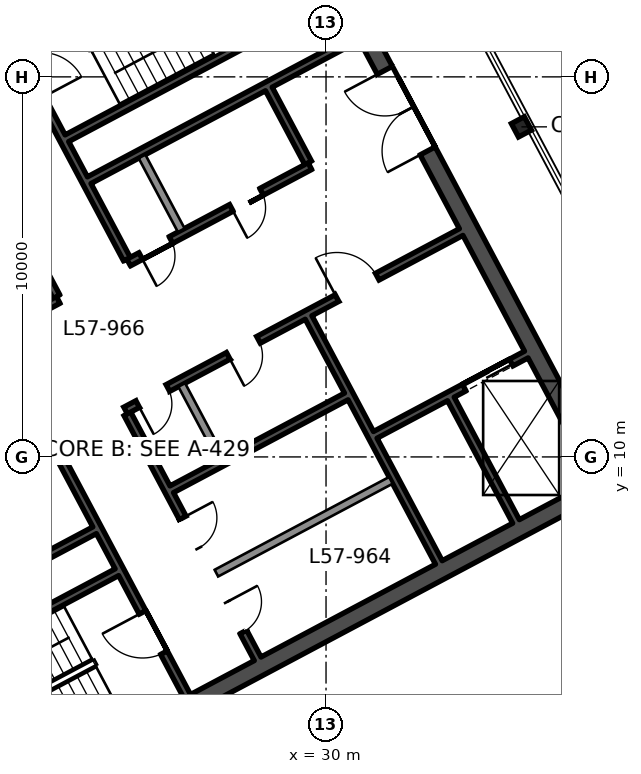
"""IFC4 building model, lengths in metres.
Left out: names, types, materials, properties, quantities, classifications, styles, units other than length and angle.
Written with IfcOpenShell. Run it as: python <this file> out.ifc"""

import sys

from ifc_helpers import new_model, si_unit, direction, frame, frame_2d, origin, origin_2d, place, context, subcontext, project, spatial, rectangle, i_section, extrude, element, fill, save


model = new_model("IFC4")
c1 = context("Model", 3, precision=1e-05, world=origin(), true_north=direction((0.0, 1.0)))
c2 = subcontext(c1, "Body", "Model", "MODEL_VIEW")
j1 = project(units=[si_unit("LENGTHUNIT", "METRE"), si_unit("PLANEANGLEUNIT", "RADIAN")], contexts=[c1])
p1 = place(None, origin())
s1 = spatial("IfcSite", under=j1, at=p1, CompositionType="ELEMENT")
p2 = place(p1, origin())
s2 = spatial("IfcBuilding", under=s1, at=p2, CompositionType="ELEMENT")
p3 = place(p2, frame((0.0, 0.0, 258.0)))
s3 = spatial("IfcBuildingStorey", under=s2, at=p3, CompositionType="ELEMENT", Elevation=258.0)
p4 = place(p3, frame((35.141, 18.685, 0.0), z_axis=(0.0, 0.0, 1.0), x_axis=(-0.469471562786, 0.882947592859, 0.0)))
e1 = element("IfcColumn", 1, at=p4, inside=s3, PredefinedType="COLUMN", context=c2, shape_type="SweptSolid", body=[
    extrude(i_section(OverallWidth=0.399, OverallDepth=0.386, WebThickness=0.021, FlangeThickness=0.033, FilletRadius=0.015, at=origin_2d()), origin(), (0.0, 0.0, 1.0), 3.9),
])
p5 = place(p3, frame((37.439, 9.091, 0.0), z_axis=(0.0, 0.0, 1.0), x_axis=(-0.469467968382, 0.882949504028, 0.0)))
e2 = element("IfcWall", 2, at=p5, inside=s3, PredefinedType="SHEAR", context=c2, shape_type="SweptSolid", body=[
    extrude(rectangle(XDim=19.1, YDim=0.45, at=frame_2d((9.55, 0.0))), origin(), (0.0, 0.0, 1.0), 3.9),
])
p6 = place(p5, frame((10.15, 0.0, 0.0)))
e3 = element("IfcOpeningElement", 3, at=p6, cuts=e2, PredefinedType="OPENING", context=c2, shape_type="SweptSolid", body=[
    extrude(rectangle(XDim=2.4, YDim=2.4, at=frame_2d((1.2, 1.2))), frame((0.0, 0.235, 0.0), z_axis=(0.0, -1.0, 0.0), x_axis=(1.0, 0.0, 0.0)), (0.0, 0.0, 1.0), 0.47),
])
p7 = place(p3, frame((19.3, -0.299, 0.0), z_axis=(0.0, 0.0, 1.0), x_axis=(0.88295276571, 0.46946183394, 0.0)))
e4 = element("IfcWall", 4, at=p7, inside=s3, PredefinedType="SHEAR", context=c2, shape_type="SweptSolid", body=[
    extrude(rectangle(XDim=20.2, YDim=0.45, at=frame_2d((10.1, 0.0))), origin(), (0.0, 0.0, 1.0), 3.9),
])
p8 = place(p3, frame((10.544, 16.167, 0.0), z_axis=(0.0, 0.0, 1.0), x_axis=(0.882947755831, 0.46947125628, 0.0)))
e5 = element("IfcWall", 5, at=p8, inside=s3, PredefinedType="SHEAR", context=c2, shape_type="SweptSolid", body=[
    extrude(rectangle(XDim=20.2, YDim=0.45, at=frame_2d((10.1, 0.0))), origin(), (0.0, 0.0, 1.0), 3.9),
])
p9 = place(p3, frame((26.346, 3.702, 0.0), z_axis=(0.0, 0.0, 1.0), x_axis=(-0.469480409012, 0.88294288918, 0.0)))
e6 = element("IfcWall", 6, at=p9, inside=s3, PredefinedType="SHEAR", context=c2, shape_type="SweptSolid", body=[
    extrude(rectangle(XDim=7.3, YDim=0.2, at=frame_2d((3.65, 0.0))), origin(), (0.0, 0.0, 1.0), 3.9),
])
p10 = place(p9, frame((1.3, 0.0, 0.0)))
e7 = element("IfcOpeningElement", 7, at=p10, cuts=e6, PredefinedType="OPENING", context=c2, shape_type="SweptSolid", body=[
    extrude(rectangle(XDim=1.2, YDim=2.1, at=frame_2d((0.6, 1.05))), frame((0.0, 0.11, 0.0), z_axis=(0.0, -1.0, 0.0), x_axis=(1.0, 0.0, 0.0)), (0.0, 0.0, 1.0), 0.22),
])
p11 = place(p3, frame((22.906, 14.218, 0.0), z_axis=(0.0, 0.0, 1.0), x_axis=(-0.469480409012, 0.88294288918, 0.0)))
e8 = element("IfcWall", 8, at=p11, inside=s3, PredefinedType="SHEAR", context=c2, shape_type="SweptSolid", body=[
    extrude(rectangle(XDim=7.3, YDim=0.2, at=frame_2d((3.65, 0.0))), origin(), (0.0, 0.0, 1.0), 3.9),
])
p12 = place(p11, frame((2.6, 0.0, 0.0)))
e9 = element("IfcOpeningElement", 9, at=p12, cuts=e8, PredefinedType="OPENING", context=c2, shape_type="SweptSolid", body=[
    extrude(rectangle(XDim=0.9, YDim=2.1, at=frame_2d((0.45, 1.05))), frame((0.0, 0.11, 0.0), z_axis=(0.0, -1.0, 0.0), x_axis=(1.0, 0.0, 0.0)), (0.0, 0.0, 1.0), 0.22),
])
p13 = place(p11, frame((4.2, 0.0, 0.0)))
e10 = element("IfcOpeningElement", 10, at=p13, cuts=e8, PredefinedType="OPENING", context=c2, shape_type="SweptSolid", body=[
    extrude(rectangle(XDim=0.9, YDim=2.1, at=frame_2d((0.45, 1.05))), frame((0.0, 0.11, 0.0), z_axis=(0.0, -1.0, 0.0), x_axis=(1.0, 0.0, 0.0)), (0.0, 0.0, 1.0), 0.22),
])
p14 = place(p11, frame((5.95, 0.0, 0.0)))
e11 = element("IfcOpeningElement", 11, at=p14, cuts=e8, PredefinedType="OPENING", context=c2, shape_type="SweptSolid", body=[
    extrude(rectangle(XDim=0.9, YDim=2.1, at=frame_2d((0.45, 1.05))), frame((0.0, 0.11, 0.0), z_axis=(0.0, -1.0, 0.0), x_axis=(1.0, 0.0, 0.0)), (0.0, 0.0, 1.0), 0.22),
])
p15 = place(p3, frame((28.2, 4.688, 0.0), z_axis=(0.0, 0.0, 1.0), x_axis=(-0.469454336211, 0.882956752176, 0.0)))
e12 = element("IfcWall", 12, at=p15, inside=s3, PredefinedType="SHEAR", context=c2, shape_type="SweptSolid", body=[
    extrude(rectangle(XDim=7.3, YDim=0.2, at=frame_2d((3.65, 0.0))), origin(), (0.0, 0.0, 1.0), 3.9),
])
p16 = place(p15, frame((0.8, 0.0, 0.0)))
e13 = element("IfcOpeningElement", 13, at=p16, cuts=e12, PredefinedType="OPENING", context=c2, shape_type="SweptSolid", body=[
    extrude(rectangle(XDim=0.9, YDim=2.1, at=frame_2d((0.45, 1.05))), frame((0.0, 0.11, 0.0), z_axis=(0.0, -1.0, 0.0), x_axis=(1.0, 0.0, 0.0)), (0.0, 0.0, 1.0), 0.22),
])
p17 = place(p15, frame((3.3, 0.0, 0.0)))
e14 = element("IfcOpeningElement", 14, at=p17, cuts=e12, PredefinedType="OPENING", context=c2, shape_type="SweptSolid", body=[
    extrude(rectangle(XDim=0.9, YDim=2.1, at=frame_2d((0.45, 1.05))), frame((0.0, 0.11, 0.0), z_axis=(0.0, -1.0, 0.0), x_axis=(1.0, 0.0, 0.0)), (0.0, 0.0, 1.0), 0.22),
])
p18 = place(p3, frame((27.236, 9.951, 0.0), z_axis=(0.0, 0.0, 1.0), x_axis=(-0.4694473164, 0.882960484464, 0.0)))
e15 = element("IfcWall", 15, at=p18, inside=s3, PredefinedType="SOLIDWALL", context=c2, shape_type="SweptSolid", body=[
    extrude(rectangle(XDim=2.2, YDim=0.2, at=frame_2d((1.1, 0.0))), origin(), (0.0, 0.0, 1.0), 3.9),
])
p19 = place(p3, frame((24.76, 15.204, 0.0), z_axis=(0.0, 0.0, 1.0), x_axis=(-0.469494272526, 0.882935517501, 0.0)))
e16 = element("IfcWall", 16, at=p19, inside=s3, PredefinedType="SHEAR", context=c2, shape_type="SweptSolid", body=[
    extrude(rectangle(XDim=7.3, YDim=0.2, at=frame_2d((3.65, 0.0))), origin(), (0.0, 0.0, 1.0), 3.9),
])
p20 = place(p19, frame((4.8, 0.0, 0.0)))
e17 = element("IfcOpeningElement", 17, at=p20, cuts=e16, PredefinedType="OPENING", context=c2, shape_type="SweptSolid", body=[
    extrude(rectangle(XDim=1.2, YDim=2.1, at=frame_2d((0.6, 1.05))), frame((0.0, 0.11, 0.0), z_axis=(0.0, -1.0, 0.0), x_axis=(1.0, 0.0, 0.0)), (0.0, 0.0, 1.0), 0.22),
])
p21 = place(p3, frame((26.191, 15.965, 0.0), z_axis=(0.0, 0.0, 1.0), x_axis=(-0.469533832133, 0.882914480843, 0.0)))
e18 = element("IfcWall", 18, at=p21, inside=s3, PredefinedType="SOLIDWALL", context=c2, shape_type="SweptSolid", body=[
    extrude(rectangle(XDim=2.2, YDim=0.2, at=frame_2d((1.1, 0.0))), origin(), (0.0, 0.0, 1.0), 3.9),
])
p22 = place(p3, frame((32.968, 7.223, 0.0), z_axis=(0.0, 0.0, 1.0), x_axis=(-0.469480409012, 0.88294288918, 0.0)))
e19 = element("IfcWall", 19, at=p22, inside=s3, PredefinedType="SHEAR", context=c2, shape_type="SweptSolid", body=[
    extrude(rectangle(XDim=7.3, YDim=0.2, at=frame_2d((3.65, 0.0))), origin(), (0.0, 0.0, 1.0), 3.9),
])
p23 = place(p3, frame((29.528, 17.739, 0.0), z_axis=(0.0, 0.0, 1.0), x_axis=(-0.469401318492, 0.882984938828, 0.0)))
e20 = element("IfcWall", 20, at=p23, inside=s3, PredefinedType="SHEAR", context=c2, shape_type="SweptSolid", body=[
    extrude(rectangle(XDim=2.2, YDim=0.2, at=frame_2d((1.1, 0.0))), origin(), (0.0, 0.0, 1.0), 3.9),
])
p24 = place(p3, frame((34.999, 8.303, 0.0), z_axis=(0.0, 0.0, 1.0), x_axis=(-0.4694665462, 0.882950260207, 0.0)))
e21 = element("IfcWall", 21, at=p24, inside=s3, PredefinedType="SHEAR", context=c2, shape_type="SweptSolid", body=[
    extrude(rectangle(XDim=3.65, YDim=0.2, at=frame_2d((1.825, 0.0))), origin(), (0.0, 0.0, 1.0), 3.9),
])
p25 = place(p3, frame((27.115, 6.942, 0.0), z_axis=(0.0, 0.0, 1.0), x_axis=(0.882934506056, 0.469496174655, 0.0)))
e22 = element("IfcWall", 22, at=p25, inside=s3, PredefinedType="SOLIDWALL", context=c2, shape_type="SweptSolid", body=[
    extrude(rectangle(XDim=5.2, YDim=0.2, at=frame_2d((2.6, 0.0))), origin(), (0.0, 0.0, 1.0), 3.9),
])
p26 = place(p3, frame((17.434, 3.21, 0.0), z_axis=(0.0, 0.0, 1.0), x_axis=(0.882940221191, 0.469485426614, 0.0)))
e23 = element("IfcWall", 23, at=p26, inside=s3, PredefinedType="SHEAR", context=c2, shape_type="SweptSolid", body=[
    extrude(rectangle(XDim=8.0, YDim=0.2, at=frame_2d((4.0, 0.0))), origin(), (0.0, 0.0, 1.0), 3.9),
])
p27 = place(p3, frame((31.296, 10.581, 0.0), z_axis=(0.0, 0.0, 1.0), x_axis=(0.882960433586, 0.469447412093, 0.0)))
e24 = element("IfcWall", 24, at=p27, inside=s3, PredefinedType="SHEAR", context=c2, shape_type="SweptSolid", body=[
    extrude(rectangle(XDim=4.5, YDim=0.2, at=frame_2d((2.25, 0.0))), origin(), (0.0, 0.0, 1.0), 3.9),
])
p28 = place(p27, frame((2.65, 0.0, 0.0)))
e25 = element("IfcOpeningElement", 25, at=p28, cuts=e24, PredefinedType="OPENING", context=c2, shape_type="SweptSolid", body=[
    extrude(rectangle(XDim=1.4, YDim=2.4, at=frame_2d((0.7, 1.2))), frame((0.0, 0.11, 0.0), z_axis=(0.0, -1.0, 0.0), x_axis=(1.0, 0.0, 0.0)), (0.0, 0.0, 1.0), 0.22),
])
p29 = place(p3, frame((16.847, 4.314, 0.0), z_axis=(0.0, 0.0, 1.0), x_axis=(0.882940221191, 0.469485426614, 0.0)))
e26 = element("IfcWall", 26, at=p29, inside=s3, PredefinedType="SHEAR", context=c2, shape_type="SweptSolid", body=[
    extrude(rectangle(XDim=8.0, YDim=0.2, at=frame_2d((4.0, 0.0))), origin(), (0.0, 0.0, 1.0), 3.9),
])
p30 = place(p3, frame((25.941, 9.15, 0.0), z_axis=(0.0, 0.0, 1.0), x_axis=(0.882953967957, 0.469459572775, 0.0)))
e27 = element("IfcWall", 27, at=p30, inside=s3, PredefinedType="SHEAR", context=c2, shape_type="SweptSolid", body=[
    extrude(rectangle(XDim=5.2, YDim=0.2, at=frame_2d((2.6, 0.0))), origin(), (0.0, 0.0, 1.0), 3.9),
])
p31 = place(p3, frame((18.104, 7.701, 0.0), z_axis=(0.0, 0.0, 1.0), x_axis=(0.882952937579, 0.469461510692, 0.0)))
e28 = element("IfcWall", 28, at=p31, inside=s3, PredefinedType="SHEAR", context=c2, shape_type="SweptSolid", body=[
    extrude(rectangle(XDim=5.4, YDim=0.2, at=frame_2d((2.7, 0.0))), origin(), (0.0, 0.0, 1.0), 3.9),
])
p32 = place(p31, frame((0.36, 0.0, 0.0)))
e29 = element("IfcOpeningElement", 29, at=p32, cuts=e28, PredefinedType="OPENING", context=c2, shape_type="SweptSolid", body=[
    extrude(rectangle(XDim=0.9, YDim=2.1, at=frame_2d((0.45, 1.05))), frame((0.0, 0.11, 0.0), z_axis=(0.0, -1.0, 0.0), x_axis=(1.0, 0.0, 0.0)), (0.0, 0.0, 1.0), 0.22),
])
p33 = place(p31, frame((3.06, 0.0, 0.0)))
e30 = element("IfcOpeningElement", 30, at=p33, cuts=e28, PredefinedType="OPENING", context=c2, shape_type="SweptSolid", body=[
    extrude(rectangle(XDim=0.9, YDim=2.1, at=frame_2d((0.45, 1.05))), frame((0.0, 0.11, 0.0), z_axis=(0.0, -1.0, 0.0), x_axis=(1.0, 0.0, 0.0)), (0.0, 0.0, 1.0), 0.22),
])
p34 = place(p3, frame((24.726, 11.222, 0.0), z_axis=(0.0, 0.0, 1.0), x_axis=(0.882940221191, 0.469485426614, 0.0)))
e31 = element("IfcWall", 31, at=p34, inside=s3, PredefinedType="SHEAR", context=c2, shape_type="SweptSolid", body=[
    extrude(rectangle(XDim=10.0, YDim=0.2, at=frame_2d((5.0, 0.0))), origin(), (0.0, 0.0, 1.0), 3.9),
])
p35 = place(p34, frame((6.3, 0.0, 0.0)))
e32 = element("IfcOpeningElement", 32, at=p35, cuts=e31, PredefinedType="OPENING", context=c2, shape_type="SweptSolid", body=[
    extrude(rectangle(XDim=1.2, YDim=2.1, at=frame_2d((0.6, 1.05))), frame((0.0, 0.11, 0.0), z_axis=(0.0, -1.0, 0.0), x_axis=(1.0, 0.0, 0.0)), (0.0, 0.0, 1.0), 0.22),
])
p36 = place(p34, frame((0.36, 0.0, 0.0)))
e33 = element("IfcOpeningElement", 33, at=p36, cuts=e31, PredefinedType="OPENING", context=c2, shape_type="SweptSolid", body=[
    extrude(rectangle(XDim=0.9, YDim=2.1, at=frame_2d((0.45, 1.05))), frame((0.0, 0.11, 0.0), z_axis=(0.0, -1.0, 0.0), x_axis=(1.0, 0.0, 0.0)), (0.0, 0.0, 1.0), 0.22),
])
p37 = place(p34, frame((3.06, 0.0, 0.0)))
e34 = element("IfcOpeningElement", 34, at=p37, cuts=e31, PredefinedType="OPENING", context=c2, shape_type="SweptSolid", body=[
    extrude(rectangle(XDim=0.9, YDim=2.1, at=frame_2d((0.45, 1.05))), frame((0.0, 0.11, 0.0), z_axis=(0.0, -1.0, 0.0), x_axis=(1.0, 0.0, 0.0)), (0.0, 0.0, 1.0), 0.22),
])
p38 = place(p3, frame((14.124, 9.435, 0.0), z_axis=(0.0, 0.0, 1.0), x_axis=(0.882940221191, 0.469485426614, 0.0)))
e35 = element("IfcWall", 35, at=p38, inside=s3, PredefinedType="SHEAR", context=c2, shape_type="SweptSolid", body=[
    extrude(rectangle(XDim=10.0, YDim=0.2, at=frame_2d((5.0, 0.0))), origin(), (0.0, 0.0, 1.0), 3.9),
])
p39 = place(p38, frame((2.1, 0.0, 0.0)))
e36 = element("IfcOpeningElement", 36, at=p39, cuts=e35, PredefinedType="OPENING", context=c2, shape_type="SweptSolid", body=[
    extrude(rectangle(XDim=1.2, YDim=2.1, at=frame_2d((0.6, 1.05))), frame((0.0, 0.11, 0.0), z_axis=(0.0, -1.0, 0.0), x_axis=(1.0, 0.0, 0.0)), (0.0, 0.0, 1.0), 0.22),
])
p40 = place(p38, frame((4.96, 0.0, 0.0)))
e37 = element("IfcOpeningElement", 37, at=p40, cuts=e35, PredefinedType="OPENING", context=c2, shape_type="SweptSolid", body=[
    extrude(rectangle(XDim=0.9, YDim=2.1, at=frame_2d((0.45, 1.05))), frame((0.0, 0.11, 0.0), z_axis=(0.0, -1.0, 0.0), x_axis=(1.0, 0.0, 0.0)), (0.0, 0.0, 1.0), 0.22),
])
p41 = place(p38, frame((7.66, 0.0, 0.0)))
e38 = element("IfcOpeningElement", 38, at=p41, cuts=e35, PredefinedType="OPENING", context=c2, shape_type="SweptSolid", body=[
    extrude(rectangle(XDim=0.9, YDim=2.1, at=frame_2d((0.45, 1.05))), frame((0.0, 0.11, 0.0), z_axis=(0.0, -1.0, 0.0), x_axis=(1.0, 0.0, 0.0)), (0.0, 0.0, 1.0), 0.22),
])
p42 = place(p3, frame((24.807, 15.116, 0.0), z_axis=(0.0, 0.0, 1.0), x_axis=(0.882942972946, 0.469480251476, 0.0)))
e39 = element("IfcWall", 39, at=p42, inside=s3, PredefinedType="SHEAR", context=c2, shape_type="SweptSolid", body=[
    extrude(rectangle(XDim=5.4, YDim=0.2, at=frame_2d((2.7, 0.0))), origin(), (0.0, 0.0, 1.0), 3.9),
])
p43 = place(p42, frame((0.36, 0.0, 0.0)))
e40 = element("IfcOpeningElement", 40, at=p43, cuts=e39, PredefinedType="OPENING", context=c2, shape_type="SweptSolid", body=[
    extrude(rectangle(XDim=0.9, YDim=2.1, at=frame_2d((0.45, 1.05))), frame((0.0, 0.11, 0.0), z_axis=(0.0, -1.0, 0.0), x_axis=(1.0, 0.0, 0.0)), (0.0, 0.0, 1.0), 0.22),
])
p44 = place(p42, frame((3.06, 0.0, 0.0)))
e41 = element("IfcOpeningElement", 41, at=p44, cuts=e39, PredefinedType="OPENING", context=c2, shape_type="SweptSolid", body=[
    extrude(rectangle(XDim=0.9, YDim=2.1, at=frame_2d((0.45, 1.05))), frame((0.0, 0.11, 0.0), z_axis=(0.0, -1.0, 0.0), x_axis=(1.0, 0.0, 0.0)), (0.0, 0.0, 1.0), 0.22),
])
p45 = place(p3, frame((23.769, 17.282, 0.0), z_axis=(0.0, 0.0, 1.0), x_axis=(0.882940221191, 0.469485426614, 0.0)))
e42 = element("IfcWall", 42, at=p45, inside=s3, PredefinedType="SHEAR", context=c2, shape_type="SweptSolid", body=[
    extrude(rectangle(XDim=8.0, YDim=0.2, at=frame_2d((4.0, 0.0))), origin(), (0.0, 0.0, 1.0), 3.9),
])
p46 = place(p3, frame((23.182, 18.385, 0.0), z_axis=(0.0, 0.0, 1.0), x_axis=(0.88295287151, 0.469461634952, 0.0)))
e43 = element("IfcWall", 43, at=p46, inside=s3, PredefinedType="SHEAR", context=c2, shape_type="SweptSolid", body=[
    extrude(rectangle(XDim=8.0, YDim=0.2, at=frame_2d((4.0, 0.0))), origin(), (0.0, 0.0, 1.0), 3.9),
])
p47 = place(p3, frame((3.482, 18.16, 0.0), z_axis=(0.0, 0.0, 1.0), x_axis=(0.882943240209, 0.469479748838, 0.0)))
e44 = element("IfcWall", 44, at=p47, inside=s3, PredefinedType="PARTITIONING", context=c2, shape_type="SweptSolid", body=[
    extrude(rectangle(XDim=28.6, YDim=0.15, at=frame_2d((14.3, 0.0))), origin(), (0.0, 0.0, 1.0), 3.54),
])
p48 = place(p3, frame((31.482, 0.43, 0.0), z_axis=(0.0, 0.0, 1.0), x_axis=(0.882810515835, 0.469729276426, 0.0)))
e45 = element("IfcWall", 45, at=p48, inside=s3, PredefinedType="PARTITIONING", context=c2, shape_type="SweptSolid", body=[
    extrude(rectangle(XDim=9.887, YDim=0.15, at=frame_2d((4.943, 0.0))), origin(), (0.0, 0.0, 1.0), 3.54),
])
p49 = place(p6, origin())
e46 = element("IfcDoor", 46, at=p49, inside=s3, OperationType="DOUBLE_DOOR_SINGLE_SWING", PredefinedType="DOOR", context=c2, shape_type="SweptSolid", body=[
    extrude(rectangle(XDim=2.4, YDim=2.4, at=frame_2d((1.2, 1.2))), frame((0.0, 0.025, 0.0), z_axis=(0.0, -1.0, 0.0), x_axis=(1.0, 0.0, 0.0)), (0.0, 0.0, 1.0), 0.05),
])
fill(e3, e46)
p50 = place(p35, origin())
e47 = element("IfcDoor", 47, at=p50, inside=s3, OperationType="SINGLE_SWING_LEFT", PredefinedType="DOOR", context=c2, shape_type="SweptSolid", body=[
    extrude(rectangle(XDim=1.2, YDim=2.1, at=frame_2d((0.6, 1.05))), frame((0.0, 0.025, 0.0), z_axis=(0.0, -1.0, 0.0), x_axis=(1.0, 0.0, 0.0)), (0.0, 0.0, 1.0), 0.05),
])
fill(e32, e47)
p51 = place(p10, origin())
e48 = element("IfcDoor", 48, at=p51, inside=s3, OperationType="SINGLE_SWING_RIGHT", PredefinedType="DOOR", context=c2, shape_type="SweptSolid", body=[
    extrude(rectangle(XDim=1.2, YDim=2.1, at=frame_2d((0.6, 1.05))), frame((0.0, 0.025, 0.0), z_axis=(0.0, -1.0, 0.0), x_axis=(1.0, 0.0, 0.0)), (0.0, 0.0, 1.0), 0.05),
])
fill(e7, e48)
p52 = place(p43, frame((0.9, 0.0, 0.0), z_axis=(0.0, 0.0, 1.0), x_axis=(-1.0, 0.0, 0.0)))
e49 = element("IfcDoor", 49, at=p52, inside=s3, OperationType="SINGLE_SWING_RIGHT", PredefinedType="DOOR", context=c2, shape_type="SweptSolid", body=[
    extrude(rectangle(XDim=0.9, YDim=2.1, at=frame_2d((0.45, 1.05))), frame((0.0, 0.025, 0.0), z_axis=(0.0, -1.0, 0.0), x_axis=(1.0, 0.0, 0.0)), (0.0, 0.0, 1.0), 0.05),
])
fill(e40, e49)
p53 = place(p44, frame((0.9, 0.0, 0.0), z_axis=(0.0, 0.0, 1.0), x_axis=(-1.0, 0.0, 0.0)))
e50 = element("IfcDoor", 50, at=p53, inside=s3, OperationType="SINGLE_SWING_RIGHT", PredefinedType="DOOR", context=c2, shape_type="SweptSolid", body=[
    extrude(rectangle(XDim=0.9, YDim=2.1, at=frame_2d((0.45, 1.05))), frame((0.0, 0.025, 0.0), z_axis=(0.0, -1.0, 0.0), x_axis=(1.0, 0.0, 0.0)), (0.0, 0.0, 1.0), 0.05),
])
fill(e41, e50)
p54 = place(p36, frame((0.9, 0.0, 0.0), z_axis=(0.0, 0.0, 1.0), x_axis=(-1.0, 0.0, 0.0)))
e51 = element("IfcDoor", 51, at=p54, inside=s3, OperationType="SINGLE_SWING_RIGHT", PredefinedType="DOOR", context=c2, shape_type="SweptSolid", body=[
    extrude(rectangle(XDim=0.9, YDim=2.1, at=frame_2d((0.45, 1.05))), frame((0.0, 0.025, 0.0), z_axis=(0.0, -1.0, 0.0), x_axis=(1.0, 0.0, 0.0)), (0.0, 0.0, 1.0), 0.05),
])
fill(e33, e51)
p55 = place(p37, frame((0.9, 0.0, 0.0), z_axis=(0.0, 0.0, 1.0), x_axis=(-1.0, 0.0, 0.0)))
e52 = element("IfcDoor", 52, at=p55, inside=s3, OperationType="SINGLE_SWING_RIGHT", PredefinedType="DOOR", context=c2, shape_type="SweptSolid", body=[
    extrude(rectangle(XDim=0.9, YDim=2.1, at=frame_2d((0.45, 1.05))), frame((0.0, 0.025, 0.0), z_axis=(0.0, -1.0, 0.0), x_axis=(1.0, 0.0, 0.0)), (0.0, 0.0, 1.0), 0.05),
])
fill(e34, e52)
p56 = place(p28, origin())
e53 = element("IfcDoor", 53, at=p56, inside=s3, OperationType="DOUBLE_DOOR_SLIDING", PredefinedType="DOOR", context=c2, shape_type="SweptSolid", body=[
    extrude(rectangle(XDim=1.4, YDim=2.4, at=frame_2d((0.7, 1.2))), frame((0.0, 0.025, 0.0), z_axis=(0.0, -1.0, 0.0), x_axis=(1.0, 0.0, 0.0)), (0.0, 0.0, 1.0), 0.05),
])
fill(e25, e53)
p57 = place(p16, frame((0.9, 0.0, 0.0), z_axis=(0.0, 0.0, 1.0), x_axis=(-1.0, 0.0, 0.0)))
e54 = element("IfcDoor", 54, at=p57, inside=s3, OperationType="SINGLE_SWING_LEFT", PredefinedType="DOOR", context=c2, shape_type="SweptSolid", body=[
    extrude(rectangle(XDim=0.9, YDim=2.1, at=frame_2d((0.45, 1.05))), frame((0.0, 0.025, 0.0), z_axis=(0.0, -1.0, 0.0), x_axis=(1.0, 0.0, 0.0)), (0.0, 0.0, 1.0), 0.05),
])
fill(e13, e54)
p58 = place(p17, frame((0.9, 0.0, 0.0), z_axis=(0.0, 0.0, 1.0), x_axis=(-1.0, 0.0, 0.0)))
e55 = element("IfcDoor", 55, at=p58, inside=s3, OperationType="SINGLE_SWING_LEFT", PredefinedType="DOOR", context=c2, shape_type="SweptSolid", body=[
    extrude(rectangle(XDim=0.9, YDim=2.1, at=frame_2d((0.45, 1.05))), frame((0.0, 0.025, 0.0), z_axis=(0.0, -1.0, 0.0), x_axis=(1.0, 0.0, 0.0)), (0.0, 0.0, 1.0), 0.05),
])
fill(e14, e55)
save(model, sys.argv[1])
